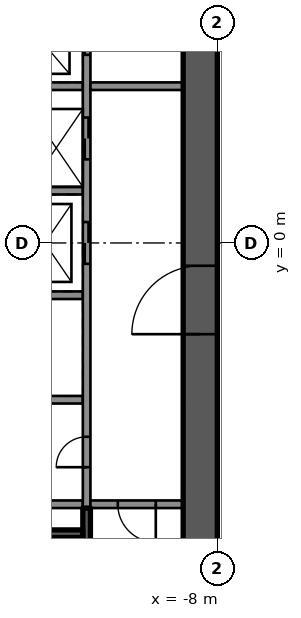
"""IFC4 building model, lengths in metres.
Left out: names, types, materials, properties, quantities, classifications, styles, units other than length and angle.
Written with IfcOpenShell. Run it as: python <this file> out.ifc"""

import sys

from ifc_helpers import new_model, si_unit, direction, frame, frame_2d, origin, place, context, subcontext, project, spatial, rectangle, extrude, element, fill, save


model = new_model("IFC4")
c1 = context("Model", 3, precision=1e-05, world=origin(), true_north=direction((0.0, 1.0)))
c2 = subcontext(c1, "Body", "Model", "MODEL_VIEW")
j1 = project(units=[si_unit("LENGTHUNIT", "METRE"), si_unit("PLANEANGLEUNIT", "RADIAN")], contexts=[c1])
p1 = place(None, origin())
s1 = spatial("IfcSite", under=j1, at=p1, CompositionType="ELEMENT")
p2 = place(p1, origin())
s2 = spatial("IfcBuilding", under=s1, at=p2, CompositionType="ELEMENT")
p3 = place(p2, frame((0.0, 0.0, 127.2)))
s3 = spatial("IfcBuildingStorey", under=s2, at=p3, CompositionType="ELEMENT", Elevation=127.2)
p4 = place(p3, frame((-8.45, -12.0, 0.0), z_axis=(0.0, 0.0, 1.0), x_axis=(0.0, 1.0, 0.0)))
e1 = element("IfcWall", 1, at=p4, inside=s3, PredefinedType="SHEAR", context=c2, shape_type="SweptSolid", body=[
    extrude(rectangle(XDim=24.0, YDim=0.9, at=frame_2d((12.0, 0.0))), origin(), (0.0, 0.0, 1.0), 3.5),
])
p5 = place(p4, frame((9.6, 0.0, 0.0)))
e2 = element("IfcOpeningElement", 2, at=p5, cuts=e1, PredefinedType="OPENING", context=c2, shape_type="SweptSolid", body=[
    extrude(rectangle(XDim=1.8, YDim=2.1, at=frame_2d((0.9, 1.05))), frame((0.0, 0.46, 0.0), z_axis=(0.0, -1.0, 0.0), x_axis=(1.0, 0.0, 0.0)), (0.0, 0.0, 1.0), 0.92),
])
p6 = place(p4, frame((19.65, 0.0, 0.0)))
e3 = element("IfcOpeningElement", 3, at=p6, cuts=e1, PredefinedType="OPENING", context=c2, shape_type="SweptSolid", body=[
    extrude(rectangle(XDim=1.1, YDim=2.1, at=frame_2d((0.55, 1.05))), frame((0.0, 0.46, 0.0), z_axis=(0.0, -1.0, 0.0), x_axis=(1.0, 0.0, 0.0)), (0.0, 0.0, 1.0), 0.92),
])
p7 = place(p3, frame((-11.54, -6.875, 0.0), z_axis=(0.0, 0.0, 1.0), x_axis=(-1.0, 0.0, 0.0)))
e4 = element("IfcWall", 4, at=p7, inside=s3, PredefinedType="SOLIDWALL", context=c2, shape_type="SweptSolid", body=[
    extrude(rectangle(XDim=6.56, YDim=0.2, at=frame_2d((3.28, 0.0))), origin(), (0.0, 0.0, 1.0), 3.09),
])
p8 = place(p3, frame((-11.54, -4.125, 0.0), z_axis=(0.0, 0.0, 1.0), x_axis=(-1.0, 0.0, 0.0)))
e5 = element("IfcWall", 5, at=p8, inside=s3, PredefinedType="SOLIDWALL", context=c2, shape_type="SweptSolid", body=[
    extrude(rectangle(XDim=4.7, YDim=0.2, at=frame_2d((2.35, 0.0))), origin(), (0.0, 0.0, 1.0), 3.09),
])
for number, where, z_axis, x_axis in (
    (6, (-11.54, -1.375, 0.0), (0.0, 0.0, 1.0), (-1.0, 0.0, 0.0)),
    (7, (-11.54, 1.375, 0.0), (0.0, 0.0, 1.0), (-1.0, 0.0, 0.0)),
):
    element("IfcWall", number, at=place(p3, frame(where, z_axis=z_axis, x_axis=x_axis)), inside=s3, PredefinedType="SOLIDWALL", context=c2, shape_type="SweptSolid", body=[
        extrude(rectangle(XDim=4.2, YDim=0.2, at=frame_2d((2.1, 0.0))), origin(), (0.0, 0.0, 1.0), 3.09),
    ])
p9 = place(p3, frame((-11.54, 4.125, 0.0), z_axis=(0.0, 0.0, 1.0), x_axis=(-1.0, 0.0, 0.0)))
e8 = element("IfcWall", 8, at=p9, inside=s3, PredefinedType="SOLIDWALL", context=c2, shape_type="SweptSolid", body=[
    extrude(rectangle(XDim=4.7, YDim=0.2, at=frame_2d((2.35, 0.0))), origin(), (0.0, 0.0, 1.0), 3.09),
])
p10 = place(p3, frame((-11.44, -6.975, 0.0), z_axis=(0.0, 0.0, 1.0), x_axis=(0.0, 1.0, 0.0)))
e9 = element("IfcWall", 9, at=p10, inside=s3, PredefinedType="SOLIDWALL", context=c2, shape_type="SweptSolid", body=[
    extrude(rectangle(XDim=13.95, YDim=0.2, at=frame_2d((6.975, 0.0))), origin(), (0.0, 0.0, 1.0), 3.09),
])
p11 = place(p10, frame((6.425, 0.0, 0.0)))
e10 = element("IfcOpeningElement", 10, at=p11, cuts=e9, PredefinedType="OPENING", context=c2, shape_type="SweptSolid", body=[
    extrude(rectangle(XDim=1.1, YDim=2.1, at=frame_2d((0.55, 1.05))), frame((0.0, 0.11, 0.0), z_axis=(0.0, -1.0, 0.0), x_axis=(1.0, 0.0, 0.0)), (0.0, 0.0, 1.0), 0.22),
])
p12 = place(p10, frame((9.175, 0.0, 0.0)))
e11 = element("IfcOpeningElement", 11, at=p12, cuts=e9, PredefinedType="OPENING", context=c2, shape_type="SweptSolid", body=[
    extrude(rectangle(XDim=1.1, YDim=2.1, at=frame_2d((0.55, 1.05))), frame((0.0, 0.11, 0.0), z_axis=(0.0, -1.0, 0.0), x_axis=(1.0, 0.0, 0.0)), (0.0, 0.0, 1.0), 0.22),
])
p13 = place(p10, frame((11.925, 0.0, 0.0)))
e12 = element("IfcOpeningElement", 12, at=p13, cuts=e9, PredefinedType="OPENING", context=c2, shape_type="SweptSolid", body=[
    extrude(rectangle(XDim=1.1, YDim=2.1, at=frame_2d((0.55, 1.05))), frame((0.0, 0.11, 0.0), z_axis=(0.0, -1.0, 0.0), x_axis=(1.0, 0.0, 0.0)), (0.0, 0.0, 1.0), 0.22),
])
p14 = place(p10, frame((1.075, 0.0, 0.0)))
e13 = element("IfcOpeningElement", 13, at=p14, cuts=e9, PredefinedType="OPENING", context=c2, shape_type="SweptSolid", body=[
    extrude(rectangle(XDim=0.8, YDim=2.1, at=frame_2d((0.4, 1.05))), frame((0.0, 0.11, 0.0), z_axis=(0.0, -1.0, 0.0), x_axis=(1.0, 0.0, 0.0)), (0.0, 0.0, 1.0), 0.22),
])
p15 = place(p3, frame((-11.44, -11.1, 0.0), z_axis=(0.0, 0.0, 1.0), x_axis=(0.0, 1.0, 0.0)))
e14 = element("IfcWall", 14, at=p15, inside=s3, PredefinedType="SOLIDWALL", context=c2, shape_type="SweptSolid", body=[
    extrude(rectangle(XDim=4.125, YDim=0.2, at=frame_2d((2.062, 0.0))), origin(), (0.0, 0.0, 1.0), 3.09),
])
p16 = place(p3, frame((-11.54, -7.65, 0.0), z_axis=(0.0, 0.0, 1.0), x_axis=(-1.0, 0.0, 0.0)))
e15 = element("IfcWall", 15, at=p16, inside=s3, PredefinedType="SOLIDWALL", context=c2, shape_type="SweptSolid", body=[
    extrude(rectangle(XDim=6.56, YDim=0.2, at=frame_2d((3.28, 0.0))), origin(), (0.0, 0.0, 1.0), 3.09),
])
p17 = place(p3, frame((-8.9, 4.125, 0.0), z_axis=(0.0, 0.0, 1.0), x_axis=(-1.0, 0.0, 0.0)))
e16 = element("IfcWall", 16, at=p17, inside=s3, PredefinedType="PARTITIONING", context=c2, shape_type="SweptSolid", body=[
    extrude(rectangle(XDim=2.44, YDim=0.2, at=frame_2d((1.22, 0.0))), origin(), (0.0, 0.0, 1.0), 3.09),
])
p18 = place(p3, frame((-8.9, -6.875, 0.0), z_axis=(0.0, 0.0, 1.0), x_axis=(-1.0, 0.0, 0.0)))
e17 = element("IfcWall", 17, at=p18, inside=s3, PredefinedType="PARTITIONING", context=c2, shape_type="SweptSolid", body=[
    extrude(rectangle(XDim=2.44, YDim=0.2, at=frame_2d((1.22, 0.0))), origin(), (0.0, 0.0, 1.0), 3.09),
])
p19 = place(p18, frame((0.72, 0.0, 0.0)))
e18 = element("IfcOpeningElement", 18, at=p19, cuts=e17, PredefinedType="OPENING", context=c2, shape_type="SweptSolid", body=[
    extrude(rectangle(XDim=1.0, YDim=2.1, at=frame_2d((0.5, 1.05))), frame((0.0, 0.11, 0.0), z_axis=(0.0, -1.0, 0.0), x_axis=(1.0, 0.0, 0.0)), (0.0, 0.0, 1.0), 0.22),
])
p20 = place(p11, origin())
e19 = element("IfcDoor", 19, at=p20, inside=s3, OperationType="DOUBLE_DOOR_SLIDING", PredefinedType="DOOR", context=c2, shape_type="SweptSolid", body=[
    extrude(rectangle(XDim=1.1, YDim=2.1, at=frame_2d((0.55, 1.05))), frame((0.0, 0.025, 0.0), z_axis=(0.0, -1.0, 0.0), x_axis=(1.0, 0.0, 0.0)), (0.0, 0.0, 1.0), 0.05),
])
fill(e10, e19)
p21 = place(p12, origin())
e20 = element("IfcDoor", 20, at=p21, inside=s3, OperationType="DOUBLE_DOOR_SLIDING", PredefinedType="DOOR", context=c2, shape_type="SweptSolid", body=[
    extrude(rectangle(XDim=1.1, YDim=2.1, at=frame_2d((0.55, 1.05))), frame((0.0, 0.025, 0.0), z_axis=(0.0, -1.0, 0.0), x_axis=(1.0, 0.0, 0.0)), (0.0, 0.0, 1.0), 0.05),
])
fill(e11, e20)
p22 = place(p13, origin())
e21 = element("IfcDoor", 21, at=p22, inside=s3, OperationType="DOUBLE_DOOR_SLIDING", PredefinedType="DOOR", context=c2, shape_type="SweptSolid", body=[
    extrude(rectangle(XDim=1.1, YDim=2.1, at=frame_2d((0.55, 1.05))), frame((0.0, 0.025, 0.0), z_axis=(0.0, -1.0, 0.0), x_axis=(1.0, 0.0, 0.0)), (0.0, 0.0, 1.0), 0.05),
])
fill(e12, e21)
p23 = place(p14, origin())
e22 = element("IfcDoor", 22, at=p23, inside=s3, OperationType="SINGLE_SWING_LEFT", PredefinedType="DOOR", context=c2, shape_type="SweptSolid", body=[
    extrude(rectangle(XDim=0.8, YDim=2.1, at=frame_2d((0.4, 1.05))), frame((0.0, 0.025, 0.0), z_axis=(0.0, -1.0, 0.0), x_axis=(1.0, 0.0, 0.0)), (0.0, 0.0, 1.0), 0.05),
])
fill(e13, e22)
p24 = place(p5, origin())
e23 = element("IfcDoor", 23, at=p24, inside=s3, OperationType="SINGLE_SWING_LEFT", PredefinedType="DOOR", context=c2, shape_type="SweptSolid", body=[
    extrude(rectangle(XDim=1.8, YDim=2.1, at=frame_2d((0.9, 1.05))), frame((0.0, 0.025, 0.0), z_axis=(0.0, -1.0, 0.0), x_axis=(1.0, 0.0, 0.0)), (0.0, 0.0, 1.0), 0.05),
])
fill(e2, e23)
p25 = place(p19, origin())
e24 = element("IfcDoor", 24, at=p25, inside=s3, OperationType="SINGLE_SWING_RIGHT", PredefinedType="DOOR", context=c2, shape_type="SweptSolid", body=[
    extrude(rectangle(XDim=1.0, YDim=2.1, at=frame_2d((0.5, 1.05))), frame((0.0, 0.025, 0.0), z_axis=(0.0, -1.0, 0.0), x_axis=(1.0, 0.0, 0.0)), (0.0, 0.0, 1.0), 0.05),
])
fill(e18, e24)
save(model, sys.argv[1])
